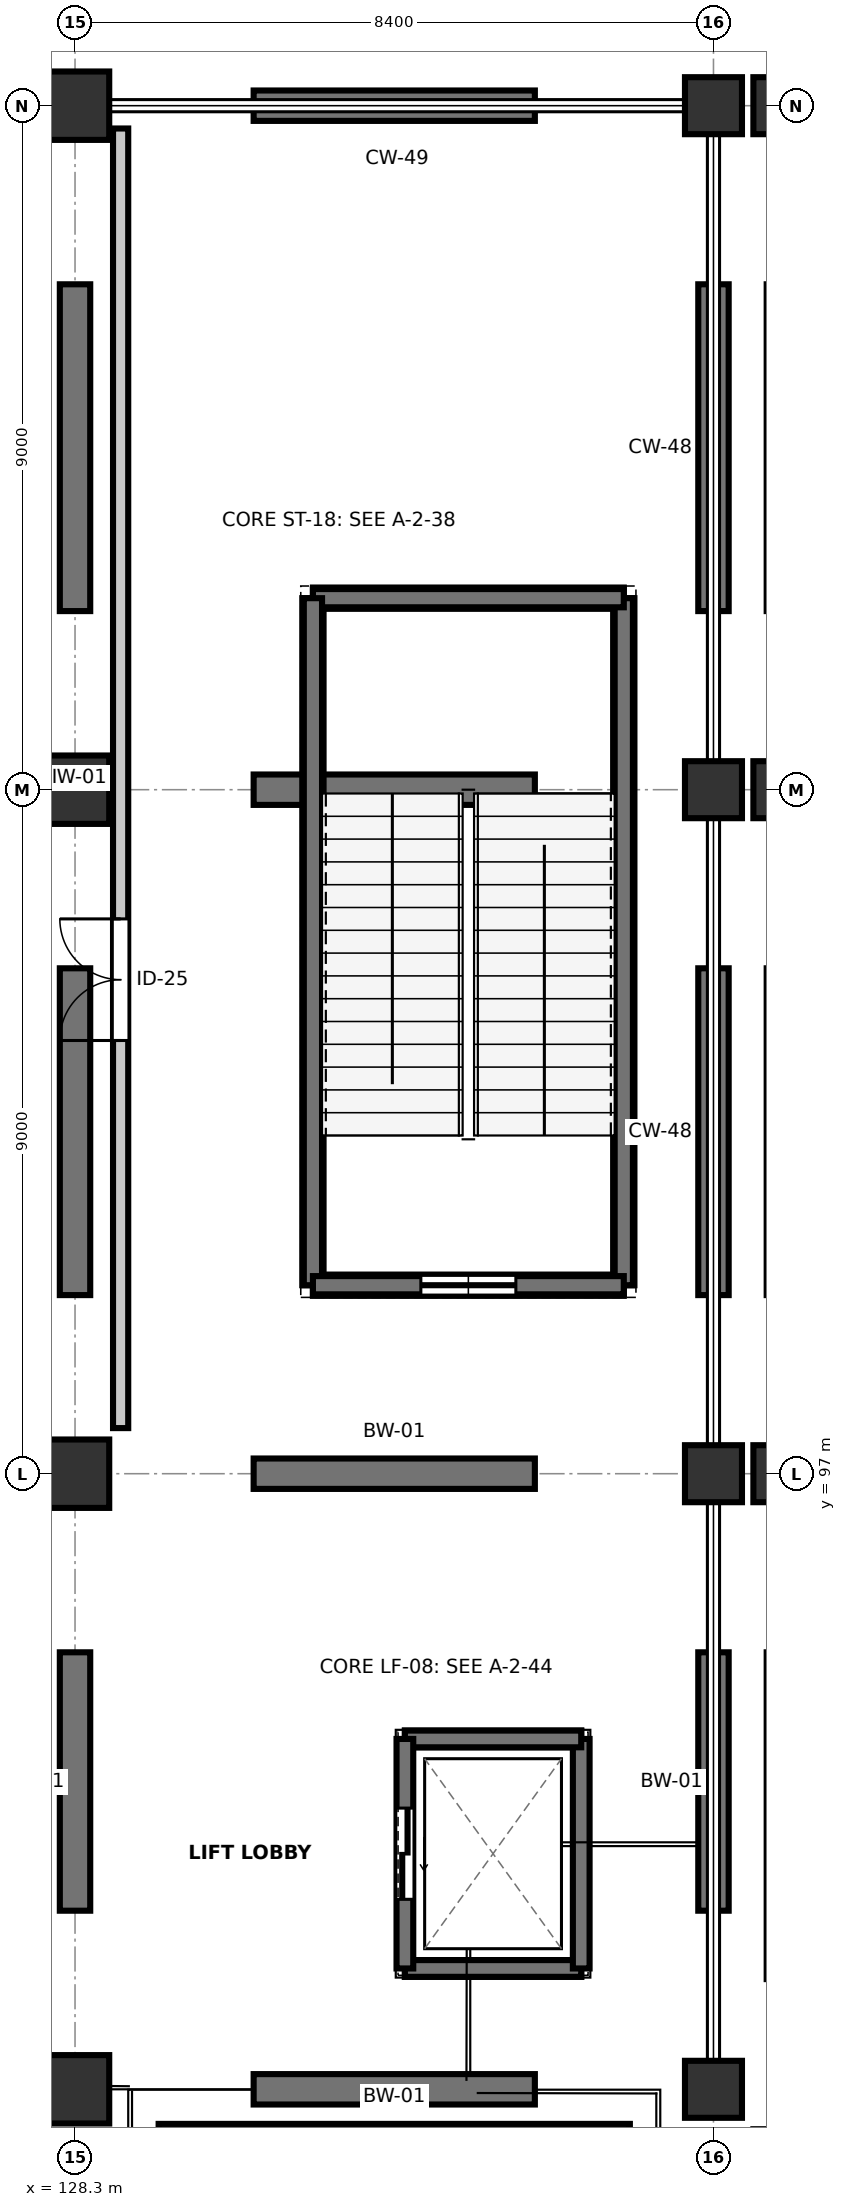
"""IFC4 building model, lengths in metres.
Left out: names, types, materials, properties, quantities, classifications, styles, units other than length and angle.
Written with IfcOpenShell. Run it as: python <this file> out.ifc"""

import sys

from ifc_helpers import new_model, si_unit, direction, frame, frame_2d, origin, origin_2d, place, context, subcontext, project, spatial, rectangle, extrude, element, fill, save


model = new_model("IFC4")
c1 = context("Model", 3, precision=1e-05, world=origin(), true_north=direction((0.0, 1.0)))
c2 = subcontext(c1, "Body", "Model", "MODEL_VIEW")
j1 = project(units=[si_unit("LENGTHUNIT", "METRE"), si_unit("PLANEANGLEUNIT", "RADIAN")], contexts=[c1])
p1 = place(None, origin())
s1 = spatial("IfcSite", under=j1, at=p1, CompositionType="ELEMENT")
p2 = place(p1, origin())
s2 = spatial("IfcBuilding", under=s1, at=p2, CompositionType="ELEMENT")
p3 = place(p2, frame((0.0, 0.0, 14.4)))
s3 = spatial("IfcBuildingStorey", under=s2, at=p3, CompositionType="ELEMENT", Elevation=14.4)
for number, where, z_axis, x_axis in (
    (1, (128.3, 88.9, 0.0), (0.0, 0.0, 1.0), (1.0, 0.0, 0.0)),
    (2, (128.3, 97.0, 0.0), (0.0, 0.0, 1.0), (1.0, 0.0, 0.0)),
    (3, (128.3, 106.0, 0.0), (0.0, 0.0, 1.0), (1.0, 0.0, 0.0)),
    (4, (128.3, 115.0, 0.0), (0.0, 0.0, 1.0), (1.0, 0.0, 0.0)),
):
    element("IfcColumn", number, at=place(p3, frame(where, z_axis=z_axis, x_axis=x_axis)), inside=s3, PredefinedType="COLUMN", context=c2, shape_type="SweptSolid", body=[
        extrude(rectangle(XDim=0.9, YDim=0.9, at=origin_2d()), origin(), (0.0, 0.0, 1.0), 4.8),
    ])
for number, where, z_axis, x_axis in (
    (5, (136.7, 88.9, 0.0), (0.0, 0.0, 1.0), (1.0, 0.0, 0.0)),
    (6, (136.7, 97.0, 0.0), (0.0, 0.0, 1.0), (1.0, 0.0, 0.0)),
    (7, (136.7, 106.0, 0.0), (0.0, 0.0, 1.0), (1.0, 0.0, 0.0)),
    (8, (136.7, 115.0, 0.0), (0.0, 0.0, 1.0), (1.0, 0.0, 0.0)),
):
    element("IfcColumn", number, at=place(p3, frame(where, z_axis=z_axis, x_axis=x_axis)), inside=s3, PredefinedType="COLUMN", context=c2, shape_type="SweptSolid", body=[
        extrude(rectangle(XDim=0.75, YDim=0.75, at=origin_2d()), origin(), (0.0, 0.0, 1.0), 4.8),
    ])
for number, where, z_axis, x_axis in (
    (9, (130.65, 88.9, -2.1), (0.0, 0.0, 1.0), (1.0, 0.0, 0.0)),
    (10, (130.65, 97.0, -2.1), (0.0, 0.0, 1.0), (1.0, 0.0, 0.0)),
    (11, (130.65, 106.0, -2.1), (0.0, 0.0, 1.0), (1.0, 0.0, 0.0)),
    (12, (130.65, 115.0, -2.1), (0.0, 0.0, 1.0), (1.0, 0.0, 0.0)),
):
    element("IfcWall", number, at=place(p3, frame(where, z_axis=z_axis, x_axis=x_axis)), inside=s3, PredefinedType="SOLIDWALL", context=c2, shape_type="SweptSolid", body=[
        extrude(rectangle(XDim=3.7, YDim=0.4, at=frame_2d((1.85, 0.0))), origin(), (0.0, 0.0, 1.0), 1.85),
    ])
p4 = place(p3, frame((128.3, 91.25, -2.1), z_axis=(0.0, 0.0, 1.0), x_axis=(0.0, 1.0, 0.0)))
e13 = element("IfcWall", 13, at=p4, inside=s3, PredefinedType="SOLIDWALL", context=c2, shape_type="SweptSolid", body=[
    extrude(rectangle(XDim=3.4, YDim=0.4, at=frame_2d((1.7, 0.0))), origin(), (0.0, 0.0, 1.0), 1.85),
])
for number, where, z_axis, x_axis in (
    (14, (128.3, 99.35, -2.1), (0.0, 0.0, 1.0), (0.0, 1.0, 0.0)),
    (15, (128.3, 108.35, -2.1), (0.0, 0.0, 1.0), (0.0, 1.0, 0.0)),
):
    element("IfcWall", number, at=place(p3, frame(where, z_axis=z_axis, x_axis=x_axis)), inside=s3, PredefinedType="SOLIDWALL", context=c2, shape_type="SweptSolid", body=[
        extrude(rectangle(XDim=4.3, YDim=0.4, at=frame_2d((2.15, 0.0))), origin(), (0.0, 0.0, 1.0), 1.85),
    ])
p5 = place(p3, frame((136.7, 91.25, -2.1), z_axis=(0.0, 0.0, 1.0), x_axis=(0.0, 1.0, 0.0)))
e16 = element("IfcWall", 16, at=p5, inside=s3, PredefinedType="SOLIDWALL", context=c2, shape_type="SweptSolid", body=[
    extrude(rectangle(XDim=3.4, YDim=0.4, at=frame_2d((1.7, 0.0))), origin(), (0.0, 0.0, 1.0), 1.85),
])
for number, where, z_axis, x_axis in (
    (17, (136.7, 99.35, -2.1), (0.0, 0.0, 1.0), (0.0, 1.0, 0.0)),
    (18, (136.7, 108.35, -2.1), (0.0, 0.0, 1.0), (0.0, 1.0, 0.0)),
):
    element("IfcWall", number, at=place(p3, frame(where, z_axis=z_axis, x_axis=x_axis)), inside=s3, PredefinedType="SOLIDWALL", context=c2, shape_type="SweptSolid", body=[
        extrude(rectangle(XDim=4.3, YDim=0.4, at=frame_2d((2.15, 0.0))), origin(), (0.0, 0.0, 1.0), 1.85),
    ])
for number, where, z_axis, x_axis in (
    (19, (137.6, 97.0, 0.0), (0.0, 0.0, 1.0), (1.0, 0.0, 0.0)),
    (20, (137.6, 106.0, 0.0), (0.0, 0.0, 1.0), (1.0, 0.0, 0.0)),
    (21, (137.6, 115.0, 0.0), (0.0, 0.0, 1.0), (1.0, 0.0, 0.0)),
):
    element("IfcColumn", number, at=place(p3, frame(where, z_axis=z_axis, x_axis=x_axis)), inside=s3, PredefinedType="COLUMN", context=c2, shape_type="SweptSolid", body=[
        extrude(rectangle(XDim=0.75, YDim=0.75, at=origin_2d()), origin(), (0.0, 0.0, 1.0), 4.8),
    ])
p6 = place(p3, frame((129.4, 88.245, -7.2), z_axis=(0.0, 0.0, 1.0), x_axis=(1.0, 0.0, 0.0)))
e22 = element("IfcWall", 22, at=p6, inside=s3, PredefinedType="SOLIDWALL", context=c2, shape_type="SweptSolid", body=[
    extrude(rectangle(XDim=6.2, YDim=0.4, at=frame_2d((3.1, 0.0))), origin(), (0.0, 0.0, 1.0), 6.98),
])
p7 = place(p3, frame((135.52, 99.48, -2.1), z_axis=(0.0, 0.0, 1.0), x_axis=(0.0, 1.0, 0.0)))
e23 = element("IfcWall", 23, at=p7, inside=s3, PredefinedType="SOLIDWALL", context=c2, shape_type="SweptSolid", body=[
    extrude(rectangle(XDim=9.04, YDim=0.28, at=frame_2d((4.52, 0.0))), origin(), (0.0, 0.0, 1.0), 1.8),
])
p8 = place(p3, frame((135.52, 108.52, -2.1), z_axis=(0.0, 0.0, 1.0), x_axis=(-1.0, 0.0, 0.0)))
e24 = element("IfcWall", 24, at=p8, inside=s3, PredefinedType="SOLIDWALL", context=c2, shape_type="SweptSolid", body=[
    extrude(rectangle(XDim=4.09, YDim=0.28, at=frame_2d((2.045, 0.0))), origin(), (0.0, 0.0, 1.0), 1.8),
])
p9 = place(p3, frame((131.43, 108.52, -2.1), z_axis=(0.0, 0.0, 1.0), x_axis=(0.0, -1.0, 0.0)))
e25 = element("IfcWall", 25, at=p9, inside=s3, PredefinedType="SOLIDWALL", context=c2, shape_type="SweptSolid", body=[
    extrude(rectangle(XDim=9.04, YDim=0.28, at=frame_2d((4.52, 0.0))), origin(), (0.0, 0.0, 1.0), 1.8),
])
p10 = place(p3, frame((131.43, 99.48, -2.1), z_axis=(0.0, 0.0, 1.0), x_axis=(1.0, 0.0, 0.0)))
e26 = element("IfcWall", 26, at=p10, inside=s3, PredefinedType="SOLIDWALL", context=c2, shape_type="SweptSolid", body=[
    extrude(rectangle(XDim=4.09, YDim=0.28, at=frame_2d((2.045, 0.0))), origin(), (0.0, 0.0, 1.0), 1.8),
])
p11 = place(p3, frame((135.52, 99.48, 0.0), z_axis=(0.0, 0.0, 1.0), x_axis=(0.0, 1.0, 0.0)))
e27 = element("IfcWall", 27, at=p11, inside=s3, PredefinedType="SHEAR", context=c2, shape_type="SweptSolid", body=[
    extrude(rectangle(XDim=9.04, YDim=0.24, at=frame_2d((4.52, 0.0))), origin(), (0.0, 0.0, 1.0), 4.5),
])
p12 = place(p3, frame((135.52, 108.52, 0.0), z_axis=(0.0, 0.0, 1.0), x_axis=(-1.0, 0.0, 0.0)))
e28 = element("IfcWall", 28, at=p12, inside=s3, PredefinedType="SHEAR", context=c2, shape_type="SweptSolid", body=[
    extrude(rectangle(XDim=4.09, YDim=0.24, at=frame_2d((2.045, 0.0))), origin(), (0.0, 0.0, 1.0), 4.5),
])
p13 = place(p3, frame((131.43, 108.52, 0.0), z_axis=(0.0, 0.0, 1.0), x_axis=(0.0, -1.0, 0.0)))
e29 = element("IfcWall", 29, at=p13, inside=s3, PredefinedType="SHEAR", context=c2, shape_type="SweptSolid", body=[
    extrude(rectangle(XDim=9.04, YDim=0.24, at=frame_2d((4.52, 0.0))), origin(), (0.0, 0.0, 1.0), 4.5),
])
p14 = place(p3, frame((131.43, 99.48, 0.0), z_axis=(0.0, 0.0, 1.0), x_axis=(1.0, 0.0, 0.0)))
e30 = element("IfcWall", 30, at=p14, inside=s3, PredefinedType="SHEAR", context=c2, shape_type="SweptSolid", body=[
    extrude(rectangle(XDim=4.09, YDim=0.24, at=frame_2d((2.045, 0.0))), origin(), (0.0, 0.0, 1.0), 4.5),
])
p15 = place(p14, frame((1.42, 0.0, 0.0)))
e31 = element("IfcOpeningElement", 31, at=p15, cuts=e30, PredefinedType="OPENING", context=c2, shape_type="SweptSolid", body=[
    extrude(rectangle(XDim=1.25, YDim=2.2, at=frame_2d((0.625, 1.1))), frame((0.0, 0.13, 0.0), z_axis=(0.0, -1.0, 0.0), x_axis=(1.0, 0.0, 0.0)), (0.0, 0.0, 1.0), 0.26),
])
for number, where, z_axis, x_axis in (
    (32, (132.64, 90.49, -1.4), (0.0, 0.0, 1.0), (1.0, 0.0, 0.0)),
    (33, (132.64, 93.51, -1.4), (0.0, 0.0, 1.0), (1.0, 0.0, 0.0)),
):
    element("IfcWall", number, at=place(p3, frame(where, z_axis=z_axis, x_axis=x_axis)), inside=s3, PredefinedType="SHEAR", context=c2, shape_type="SweptSolid", body=[
        extrude(rectangle(XDim=2.32, YDim=0.22, at=frame_2d((1.16, 0.0))), origin(), (0.0, 0.0, 1.0), 1.12),
    ])
p16 = place(p3, frame((132.64, 90.49, 0.0), z_axis=(0.0, 0.0, 1.0), x_axis=(1.0, 0.0, 0.0)))
e34 = element("IfcWall", 34, at=p16, inside=s3, PredefinedType="SHEAR", context=c2, shape_type="SweptSolid", body=[
    extrude(rectangle(XDim=2.32, YDim=0.22, at=frame_2d((1.16, 0.0))), origin(), (0.0, 0.0, 1.0), 4.5),
])
p17 = place(p3, frame((134.96, 90.49, 0.0), z_axis=(0.0, 0.0, 1.0), x_axis=(0.0, 1.0, 0.0)))
e35 = element("IfcWall", 35, at=p17, inside=s3, PredefinedType="SHEAR", context=c2, shape_type="SweptSolid", body=[
    extrude(rectangle(XDim=3.02, YDim=0.22, at=frame_2d((1.51, 0.0))), origin(), (0.0, 0.0, 1.0), 4.5),
])
p18 = place(p3, frame((134.96, 93.51, 0.0), z_axis=(0.0, 0.0, 1.0), x_axis=(-1.0, 0.0, 0.0)))
e36 = element("IfcWall", 36, at=p18, inside=s3, PredefinedType="SHEAR", context=c2, shape_type="SweptSolid", body=[
    extrude(rectangle(XDim=2.32, YDim=0.22, at=frame_2d((1.16, 0.0))), origin(), (0.0, 0.0, 1.0), 4.5),
])
p19 = place(p3, frame((132.64, 93.51, 0.0), z_axis=(0.0, 0.0, 1.0), x_axis=(0.0, -1.0, 0.0)))
e37 = element("IfcWall", 37, at=p19, inside=s3, PredefinedType="SHEAR", context=c2, shape_type="SweptSolid", body=[
    extrude(rectangle(XDim=3.02, YDim=0.22, at=frame_2d((1.51, 0.0))), origin(), (0.0, 0.0, 1.0), 4.5),
])
p20 = place(p19, frame((0.91, 0.0, 0.0)))
e38 = element("IfcOpeningElement", 38, at=p20, cuts=e37, PredefinedType="OPENING", context=c2, shape_type="SweptSolid", body=[
    extrude(rectangle(XDim=1.2, YDim=2.15, at=frame_2d((0.6, 1.075))), frame((0.0, 0.12, 0.0), z_axis=(0.0, -1.0, 0.0), x_axis=(1.0, 0.0, 0.0)), (0.0, 0.0, 1.0), 0.24),
])
p21 = place(p3, frame((128.9, 97.6, 0.0), z_axis=(0.0, 0.0, 1.0), x_axis=(0.0, 1.0, 0.0)))
e39 = element("IfcWall", 39, at=p21, inside=s3, PredefinedType="PARTITIONING", context=c2, shape_type="SweptSolid", body=[
    extrude(rectangle(XDim=17.1, YDim=0.2, at=frame_2d((8.55, 0.0))), origin(), (0.0, 0.0, 1.0), 4.035),
])
p22 = place(p21, frame((5.1, 0.0, 0.0)))
e40 = element("IfcOpeningElement", 40, at=p22, cuts=e39, PredefinedType="OPENING", context=c2, shape_type="SweptSolid", body=[
    extrude(rectangle(XDim=1.6, YDim=2.3, at=frame_2d((0.8, 1.15))), frame((0.0, 0.11, 0.0), z_axis=(0.0, -1.0, 0.0), x_axis=(1.0, 0.0, 0.0)), (0.0, 0.0, 1.0), 0.22),
])
p23 = place(p15, origin())
e41 = element("IfcDoor", 41, at=p23, inside=s3, OperationType="SINGLE_SWING_LEFT", PredefinedType="DOOR", context=c2, shape_type="SweptSolid", body=[
    extrude(rectangle(XDim=1.25, YDim=2.2, at=frame_2d((0.625, 1.1))), frame((0.0, 0.025, 0.0), z_axis=(0.0, -1.0, 0.0), x_axis=(1.0, 0.0, 0.0)), (0.0, 0.0, 1.0), 0.05),
])
fill(e31, e41)
p24 = place(p20, origin())
e42 = element("IfcDoor", 42, at=p24, inside=s3, OperationType="DOUBLE_DOOR_SLIDING", PredefinedType="DOOR", context=c2, shape_type="SweptSolid", body=[
    extrude(rectangle(XDim=1.2, YDim=2.15, at=frame_2d((0.6, 1.075))), frame((0.0, 0.025, 0.0), z_axis=(0.0, -1.0, 0.0), x_axis=(1.0, 0.0, 0.0)), (0.0, 0.0, 1.0), 0.05),
])
fill(e38, e42)
p25 = place(p22, origin())
e43 = element("IfcDoor", 43, at=p25, inside=s3, OperationType="DOUBLE_DOOR_SINGLE_SWING", PredefinedType="DOOR", context=c2, shape_type="SweptSolid", body=[
    extrude(rectangle(XDim=1.6, YDim=2.3, at=frame_2d((0.8, 1.15))), frame((0.0, 0.025, 0.0), z_axis=(0.0, -1.0, 0.0), x_axis=(1.0, 0.0, 0.0)), (0.0, 0.0, 1.0), 0.05),
])
fill(e40, e43)
save(model, sys.argv[1])
